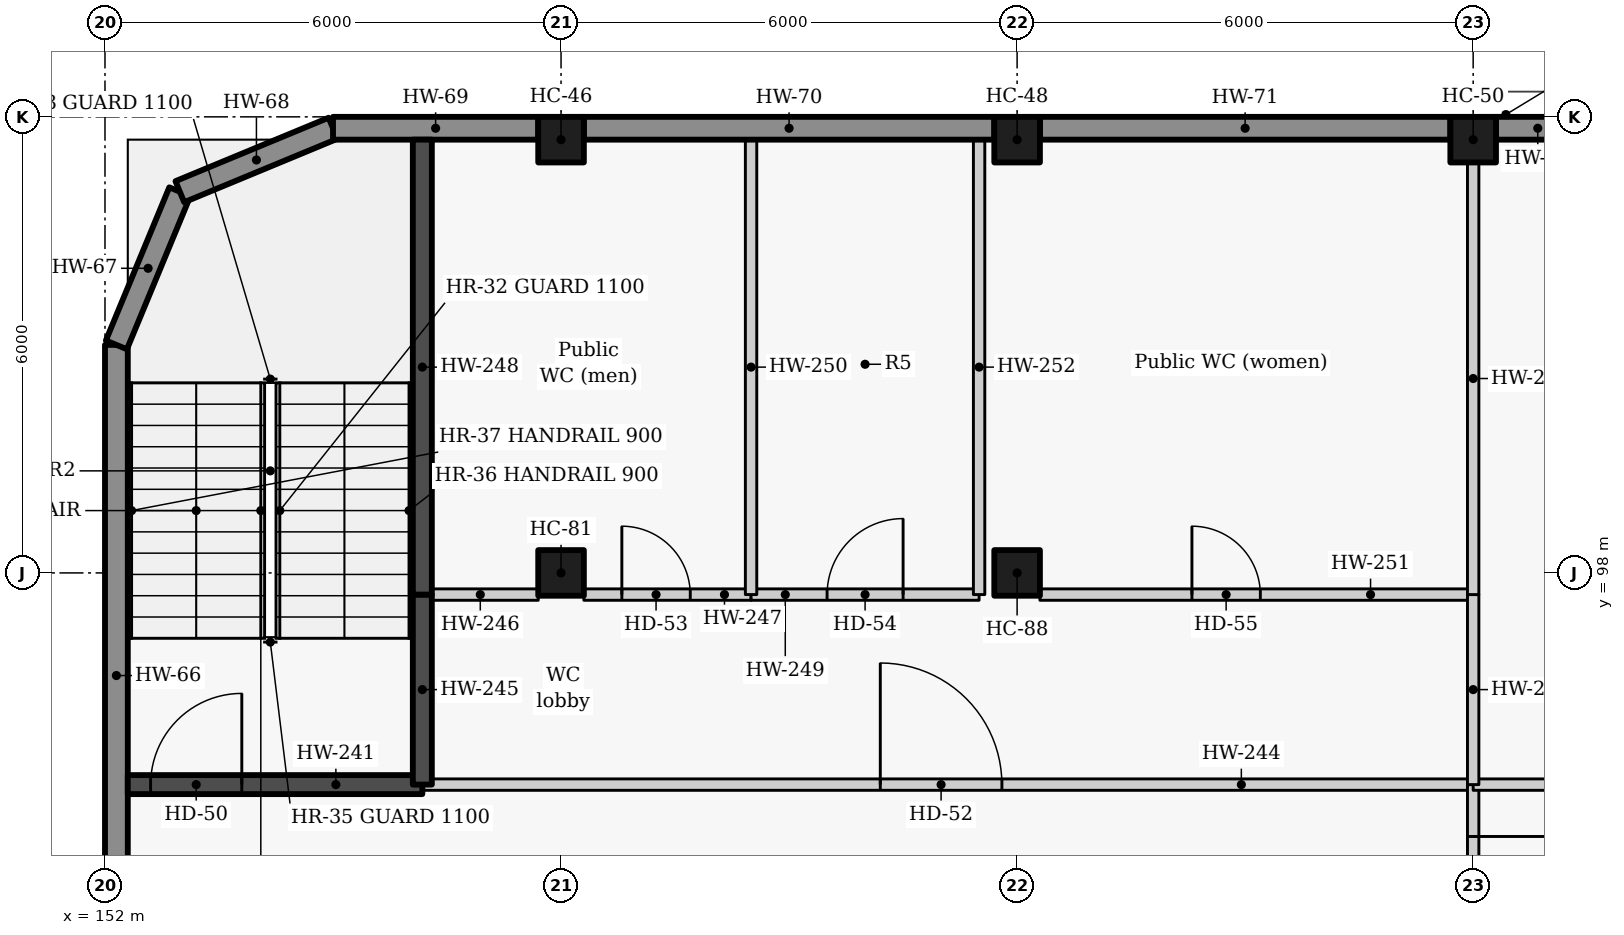
"""IFC4 building model, lengths in metres.
Left out: names, types, materials, properties, quantities, classifications, styles, units other than length and angle.
Written with IfcOpenShell. Run it as: python <this file> out.ifc"""

import sys

from ifc_helpers import new_model, si_unit, direction, frame, frame_2d, origin, origin_2d, place, context, subcontext, project, spatial, rectangle, extrude, element, fill, save


model = new_model("IFC4")
c1 = context("Model", 3, precision=1e-05, world=origin(), true_north=direction((0.0, 1.0)))
c2 = subcontext(c1, "Body", "Model", "MODEL_VIEW")
j1 = project(units=[si_unit("LENGTHUNIT", "METRE"), si_unit("PLANEANGLEUNIT", "RADIAN")], contexts=[c1])
p1 = place(None, origin())
s1 = spatial("IfcSite", under=j1, at=p1, CompositionType="ELEMENT")
p2 = place(p1, origin())
s2 = spatial("IfcBuilding", under=s1, at=p2, CompositionType="ELEMENT")
p3 = place(p2, frame((0.0, 0.0, 6.6)))
s3 = spatial("IfcBuildingStorey", under=s2, at=p3, CompositionType="ELEMENT", Elevation=6.6)
for number, where, z_axis, x_axis in (
    (1, (158.0, 103.7, 0.0), (0.0, 0.0, 1.0), (1.0, 0.0, 0.0)),
    (2, (164.0, 103.7, 0.0), (0.0, 0.0, 1.0), (1.0, 0.0, 0.0)),
    (3, (170.0, 103.7, 0.0), (0.0, 0.0, 1.0), (1.0, 0.0, 0.0)),
    (4, (158.0, 98.0, 0.0), (0.0, 0.0, 1.0), (1.0, 0.0, 0.0)),
    (5, (164.0, 98.0, 0.0), (0.0, 0.0, 1.0), (1.0, 0.0, 0.0)),
):
    element("IfcColumn", number, at=place(p3, frame(where, z_axis=z_axis, x_axis=x_axis)), inside=s3, PredefinedType="COLUMN", context=c2, shape_type="SweptSolid", body=[
        extrude(rectangle(XDim=0.6, YDim=0.6, at=origin_2d()), origin(), (0.0, 0.0, 1.0), 4.8),
    ])
p4 = place(p3, frame((152.15, 92.3, 0.0), z_axis=(0.0, 0.0, 1.0), x_axis=(0.0, 1.0, 0.0)))
e6 = element("IfcWall", 6, at=p4, inside=s3, PredefinedType="SOLIDWALL", context=c2, shape_type="SweptSolid", body=[
    extrude(rectangle(XDim=8.7, YDim=0.3, at=frame_2d((4.35, 0.0))), origin(), (0.0, 0.0, 1.0), 4.8),
])
for number, where, z_axis, x_axis in (
    (7, (152.15, 101.0, 0.0), (0.0, 0.0, 1.0), (0.383, 0.924, 0.0)),
    (8, (152.985, 103.015, 0.0), (0.0, 0.0, 1.0), (0.924, 0.383, 0.0)),
):
    element("IfcWall", number, at=place(p3, frame(where, z_axis=z_axis, x_axis=x_axis)), inside=s3, PredefinedType="SOLIDWALL", context=c2, shape_type="SweptSolid", body=[
        extrude(rectangle(XDim=2.181, YDim=0.3, at=frame_2d((1.091, 0.0))), origin(), (0.0, 0.0, 1.0), 4.8),
    ])
p5 = place(p3, frame((155.0, 103.85, 0.0), z_axis=(0.0, 0.0, 1.0), x_axis=(1.0, 0.0, 0.0)))
e9 = element("IfcWall", 9, at=p5, inside=s3, PredefinedType="SOLIDWALL", context=c2, shape_type="SweptSolid", body=[
    extrude(rectangle(XDim=2.7, YDim=0.3, at=frame_2d((1.35, 0.0))), origin(), (0.0, 0.0, 1.0), 4.8),
])
for number, where, z_axis, x_axis in (
    (10, (158.3, 103.85, 0.0), (0.0, 0.0, 1.0), (1.0, 0.0, 0.0)),
    (11, (164.3, 103.85, 0.0), (0.0, 0.0, 1.0), (1.0, 0.0, 0.0)),
):
    element("IfcWall", number, at=place(p3, frame(where, z_axis=z_axis, x_axis=x_axis)), inside=s3, PredefinedType="SOLIDWALL", context=c2, shape_type="SweptSolid", body=[
        extrude(rectangle(XDim=5.4, YDim=0.3, at=frame_2d((2.7, 0.0))), origin(), (0.0, 0.0, 1.0), 4.8),
    ])
p6 = place(p3, frame((170.3, 103.85, 0.0), z_axis=(0.0, 0.0, 1.0), x_axis=(1.0, 0.0, 0.0)))
e12 = element("IfcWall", 12, at=p6, inside=s3, PredefinedType="SOLIDWALL", context=c2, shape_type="SweptSolid", body=[
    extrude(rectangle(XDim=5.4, YDim=0.3, at=frame_2d((2.7, 0.0))), origin(), (0.0, 0.0, 1.0), 4.8),
])
p7 = place(p6, frame((1.2, 0.0, 0.9)))
e13 = element("IfcOpeningElement", 13, at=p7, cuts=e12, PredefinedType="OPENING", context=c2, shape_type="SweptSolid", body=[
    extrude(rectangle(XDim=3.0, YDim=1.8, at=frame_2d((1.5, 0.9))), frame((0.0, 0.16, 0.0), z_axis=(0.0, -1.0, 0.0), x_axis=(1.0, 0.0, 0.0)), (0.0, 0.0, 1.0), 0.32),
])
p8 = place(p3, frame((152.3, 95.215, 0.0), z_axis=(0.0, 0.0, 1.0), x_axis=(1.0, 0.0, 0.0)))
e14 = element("IfcWall", 14, at=p8, inside=s3, PredefinedType="SOLIDWALL", context=c2, shape_type="SweptSolid", body=[
    extrude(rectangle(XDim=3.875, YDim=0.25, at=frame_2d((1.938, 0.0))), origin(), (0.0, 0.0, 1.0), 4.8),
])
p9 = place(p8, frame((0.3, 0.0, 0.0)))
e15 = element("IfcOpeningElement", 15, at=p9, cuts=e14, PredefinedType="OPENING", context=c2, shape_type="SweptSolid", body=[
    extrude(rectangle(XDim=1.2, YDim=2.1, at=frame_2d((0.6, 1.05))), frame((0.0, 0.135, 0.0), z_axis=(0.0, -1.0, 0.0), x_axis=(1.0, 0.0, 0.0)), (0.0, 0.0, 1.0), 0.27),
])
p10 = place(p3, frame((156.175, 95.215, 0.0), z_axis=(0.0, 0.0, 1.0), x_axis=(1.0, 0.0, 0.0)))
e16 = element("IfcWall", 16, at=p10, inside=s3, PredefinedType="PARTITIONING", context=c2, shape_type="SweptSolid", body=[
    extrude(rectangle(XDim=13.825, YDim=0.15, at=frame_2d((6.913, 0.0))), origin(), (0.0, 0.0, 1.0), 4.45),
])
p11 = place(p10, frame((6.025, 0.0, 0.0)))
e17 = element("IfcOpeningElement", 17, at=p11, cuts=e16, PredefinedType="OPENING", context=c2, shape_type="SweptSolid", body=[
    extrude(rectangle(XDim=1.6, YDim=2.1, at=frame_2d((0.8, 1.05))), frame((0.0, 0.085, 0.0), z_axis=(0.0, -1.0, 0.0), x_axis=(1.0, 0.0, 0.0)), (0.0, 0.0, 1.0), 0.17),
])
p12 = place(p3, frame((156.175, 97.715, 0.0), z_axis=(0.0, 0.0, 1.0), x_axis=(0.0, -1.0, 0.0)))
e18 = element("IfcWall", 18, at=p12, inside=s3, PredefinedType="SOLIDWALL", context=c2, shape_type="SweptSolid", body=[
    extrude(rectangle(XDim=2.5, YDim=0.25, at=frame_2d((1.25, 0.0))), origin(), (0.0, 0.0, 1.0), 4.8),
])
p13 = place(p3, frame((156.175, 97.715, 0.0), z_axis=(0.0, 0.0, 1.0), x_axis=(1.0, 0.0, 0.0)))
e19 = element("IfcWall", 19, at=p13, inside=s3, PredefinedType="PLUMBINGWALL", context=c2, shape_type="SweptSolid", body=[
    extrude(rectangle(XDim=1.525, YDim=0.15, at=frame_2d((0.762, 0.0))), origin(), (0.0, 0.0, 1.0), 4.45),
])
p14 = place(p3, frame((158.3, 97.715, 0.0), z_axis=(0.0, 0.0, 1.0), x_axis=(1.0, 0.0, 0.0)))
e20 = element("IfcWall", 20, at=p14, inside=s3, PredefinedType="PLUMBINGWALL", context=c2, shape_type="SweptSolid", body=[
    extrude(rectangle(XDim=2.2, YDim=0.15, at=frame_2d((1.1, 0.0))), origin(), (0.0, 0.0, 1.0), 4.45),
])
p15 = place(p14, frame((0.5, 0.0, 0.0)))
e21 = element("IfcOpeningElement", 21, at=p15, cuts=e20, PredefinedType="OPENING", context=c2, shape_type="SweptSolid", body=[
    extrude(rectangle(XDim=0.9, YDim=2.1, at=frame_2d((0.45, 1.05))), frame((0.0, 0.085, 0.0), z_axis=(0.0, -1.0, 0.0), x_axis=(1.0, 0.0, 0.0)), (0.0, 0.0, 1.0), 0.17),
])
p16 = place(p3, frame((156.175, 103.7, 0.0), z_axis=(0.0, 0.0, 1.0), x_axis=(0.0, -1.0, 0.0)))
e22 = element("IfcWall", 22, at=p16, inside=s3, PredefinedType="SOLIDWALL", context=c2, shape_type="SweptSolid", body=[
    extrude(rectangle(XDim=5.985, YDim=0.25, at=frame_2d((2.992, 0.0))), origin(), (0.0, 0.0, 1.0), 4.8),
])
p17 = place(p3, frame((160.5, 97.715, 0.0), z_axis=(0.0, 0.0, 1.0), x_axis=(1.0, 0.0, 0.0)))
e23 = element("IfcWall", 23, at=p17, inside=s3, PredefinedType="PLUMBINGWALL", context=c2, shape_type="SweptSolid", body=[
    extrude(rectangle(XDim=3.0, YDim=0.15, at=frame_2d((1.5, 0.0))), origin(), (0.0, 0.0, 1.0), 4.45),
])
p18 = place(p17, frame((1.0, 0.0, 0.0)))
e24 = element("IfcOpeningElement", 24, at=p18, cuts=e23, PredefinedType="OPENING", context=c2, shape_type="SweptSolid", body=[
    extrude(rectangle(XDim=1.0, YDim=2.1, at=frame_2d((0.5, 1.05))), frame((0.0, 0.085, 0.0), z_axis=(0.0, -1.0, 0.0), x_axis=(1.0, 0.0, 0.0)), (0.0, 0.0, 1.0), 0.17),
])
p19 = place(p3, frame((160.5, 103.7, 0.0), z_axis=(0.0, 0.0, 1.0), x_axis=(0.0, -1.0, 0.0)))
e25 = element("IfcWall", 25, at=p19, inside=s3, PredefinedType="PLUMBINGWALL", context=c2, shape_type="SweptSolid", body=[
    extrude(rectangle(XDim=5.985, YDim=0.15, at=frame_2d((2.992, 0.0))), origin(), (0.0, 0.0, 1.0), 4.45),
])
p20 = place(p3, frame((164.3, 97.715, 0.0), z_axis=(0.0, 0.0, 1.0), x_axis=(1.0, 0.0, 0.0)))
e26 = element("IfcWall", 26, at=p20, inside=s3, PredefinedType="PLUMBINGWALL", context=c2, shape_type="SweptSolid", body=[
    extrude(rectangle(XDim=5.7, YDim=0.15, at=frame_2d((2.85, 0.0))), origin(), (0.0, 0.0, 1.0), 4.45),
])
p21 = place(p20, frame((2.0, 0.0, 0.0)))
e27 = element("IfcOpeningElement", 27, at=p21, cuts=e26, PredefinedType="OPENING", context=c2, shape_type="SweptSolid", body=[
    extrude(rectangle(XDim=0.9, YDim=2.1, at=frame_2d((0.45, 1.05))), frame((0.0, 0.085, 0.0), z_axis=(0.0, -1.0, 0.0), x_axis=(1.0, 0.0, 0.0)), (0.0, 0.0, 1.0), 0.17),
])
p22 = place(p3, frame((163.5, 103.7, 0.0), z_axis=(0.0, 0.0, 1.0), x_axis=(0.0, -1.0, 0.0)))
e28 = element("IfcWall", 28, at=p22, inside=s3, PredefinedType="PLUMBINGWALL", context=c2, shape_type="SweptSolid", body=[
    extrude(rectangle(XDim=5.985, YDim=0.15, at=frame_2d((2.992, 0.0))), origin(), (0.0, 0.0, 1.0), 4.45),
])
p23 = place(p3, frame((170.0, 95.215, 0.0), z_axis=(0.0, 0.0, 1.0), x_axis=(0.0, -1.0, 0.0)))
e29 = element("IfcWall", 29, at=p23, inside=s3, PredefinedType="PARTITIONING", context=c2, shape_type="SweptSolid", body=[
    extrude(rectangle(XDim=2.965, YDim=0.15, at=frame_2d((1.482, 0.0))), origin(), (0.0, 0.0, 1.0), 4.45),
])
p24 = place(p23, frame((0.683, 0.0, 0.0)))
e30 = element("IfcOpeningElement", 30, at=p24, cuts=e29, PredefinedType="OPENING", context=c2, shape_type="SweptSolid", body=[
    extrude(rectangle(XDim=1.6, YDim=2.1, at=frame_2d((0.8, 1.05))), frame((0.0, 0.085, 0.0), z_axis=(0.0, -1.0, 0.0), x_axis=(1.0, 0.0, 0.0)), (0.0, 0.0, 1.0), 0.17),
])
p25 = place(p3, frame((170.0, 95.215, 0.0), z_axis=(0.0, 0.0, 1.0), x_axis=(1.0, 0.0, 0.0)))
e31 = element("IfcWall", 31, at=p25, inside=s3, PredefinedType="PARTITIONING", context=c2, shape_type="SweptSolid", body=[
    extrude(rectangle(XDim=12.0, YDim=0.15, at=frame_2d((6.0, 0.0))), origin(), (0.0, 0.0, 1.0), 4.45),
])
p26 = place(p25, frame((5.5, 0.0, 0.0)))
e32 = element("IfcOpeningElement", 32, at=p26, cuts=e31, PredefinedType="OPENING", context=c2, shape_type="SweptSolid", body=[
    extrude(rectangle(XDim=1.0, YDim=2.1, at=frame_2d((0.5, 1.05))), frame((0.0, 0.085, 0.0), z_axis=(0.0, -1.0, 0.0), x_axis=(1.0, 0.0, 0.0)), (0.0, 0.0, 1.0), 0.17),
])
p27 = place(p3, frame((170.0, 97.715, 0.0), z_axis=(0.0, 0.0, 1.0), x_axis=(0.0, -1.0, 0.0)))
e33 = element("IfcWall", 33, at=p27, inside=s3, PredefinedType="PARTITIONING", context=c2, shape_type="SweptSolid", body=[
    extrude(rectangle(XDim=2.5, YDim=0.15, at=frame_2d((1.25, 0.0))), origin(), (0.0, 0.0, 1.0), 4.45),
])
p28 = place(p3, frame((170.0, 103.4, 0.0), z_axis=(0.0, 0.0, 1.0), x_axis=(0.0, -1.0, 0.0)))
e34 = element("IfcWall", 34, at=p28, inside=s3, PredefinedType="PLUMBINGWALL", context=c2, shape_type="SweptSolid", body=[
    extrude(rectangle(XDim=5.685, YDim=0.15, at=frame_2d((2.842, 0.0))), origin(), (0.0, 0.0, 1.0), 4.45),
])
p29 = place(p9, origin())
e35 = element("IfcDoor", 35, at=p29, inside=s3, OperationType="SINGLE_SWING_RIGHT", PredefinedType="DOOR", context=c2, shape_type="SweptSolid", body=[
    extrude(rectangle(XDim=1.2, YDim=2.1, at=frame_2d((0.6, 1.05))), frame((0.0, 0.025, 0.0), z_axis=(0.0, -1.0, 0.0), x_axis=(1.0, 0.0, 0.0)), (0.0, 0.0, 1.0), 0.05),
])
fill(e15, e35)
p30 = place(p11, origin())
e36 = element("IfcDoor", 36, at=p30, inside=s3, OperationType="DOUBLE_DOOR_SINGLE_SWING", PredefinedType="DOOR", context=c2, shape_type="SweptSolid", body=[
    extrude(rectangle(XDim=1.6, YDim=2.1, at=frame_2d((0.8, 1.05))), frame((0.0, 0.025, 0.0), z_axis=(0.0, -1.0, 0.0), x_axis=(1.0, 0.0, 0.0)), (0.0, 0.0, 1.0), 0.05),
])
fill(e17, e36)
p31 = place(p15, origin())
e37 = element("IfcDoor", 37, at=p31, inside=s3, OperationType="SINGLE_SWING_LEFT", PredefinedType="DOOR", context=c2, shape_type="SweptSolid", body=[
    extrude(rectangle(XDim=0.9, YDim=2.1, at=frame_2d((0.45, 1.05))), frame((0.0, 0.025, 0.0), z_axis=(0.0, -1.0, 0.0), x_axis=(1.0, 0.0, 0.0)), (0.0, 0.0, 1.0), 0.05),
])
fill(e21, e37)
p32 = place(p18, origin())
e38 = element("IfcDoor", 38, at=p32, inside=s3, OperationType="SINGLE_SWING_RIGHT", PredefinedType="DOOR", context=c2, shape_type="SweptSolid", body=[
    extrude(rectangle(XDim=1.0, YDim=2.1, at=frame_2d((0.5, 1.05))), frame((0.0, 0.025, 0.0), z_axis=(0.0, -1.0, 0.0), x_axis=(1.0, 0.0, 0.0)), (0.0, 0.0, 1.0), 0.05),
])
fill(e24, e38)
p33 = place(p21, origin())
e39 = element("IfcDoor", 39, at=p33, inside=s3, OperationType="SINGLE_SWING_LEFT", PredefinedType="DOOR", context=c2, shape_type="SweptSolid", body=[
    extrude(rectangle(XDim=0.9, YDim=2.1, at=frame_2d((0.45, 1.05))), frame((0.0, 0.025, 0.0), z_axis=(0.0, -1.0, 0.0), x_axis=(1.0, 0.0, 0.0)), (0.0, 0.0, 1.0), 0.05),
])
fill(e27, e39)
p34 = place(p24, origin())
e40 = element("IfcDoor", 40, at=p34, inside=s3, OperationType="DOUBLE_DOOR_SINGLE_SWING", PredefinedType="DOOR", context=c2, shape_type="SweptSolid", body=[
    extrude(rectangle(XDim=1.6, YDim=2.1, at=frame_2d((0.8, 1.05))), frame((0.0, 0.025, 0.0), z_axis=(0.0, -1.0, 0.0), x_axis=(1.0, 0.0, 0.0)), (0.0, 0.0, 1.0), 0.05),
])
fill(e30, e40)
save(model, sys.argv[1])
